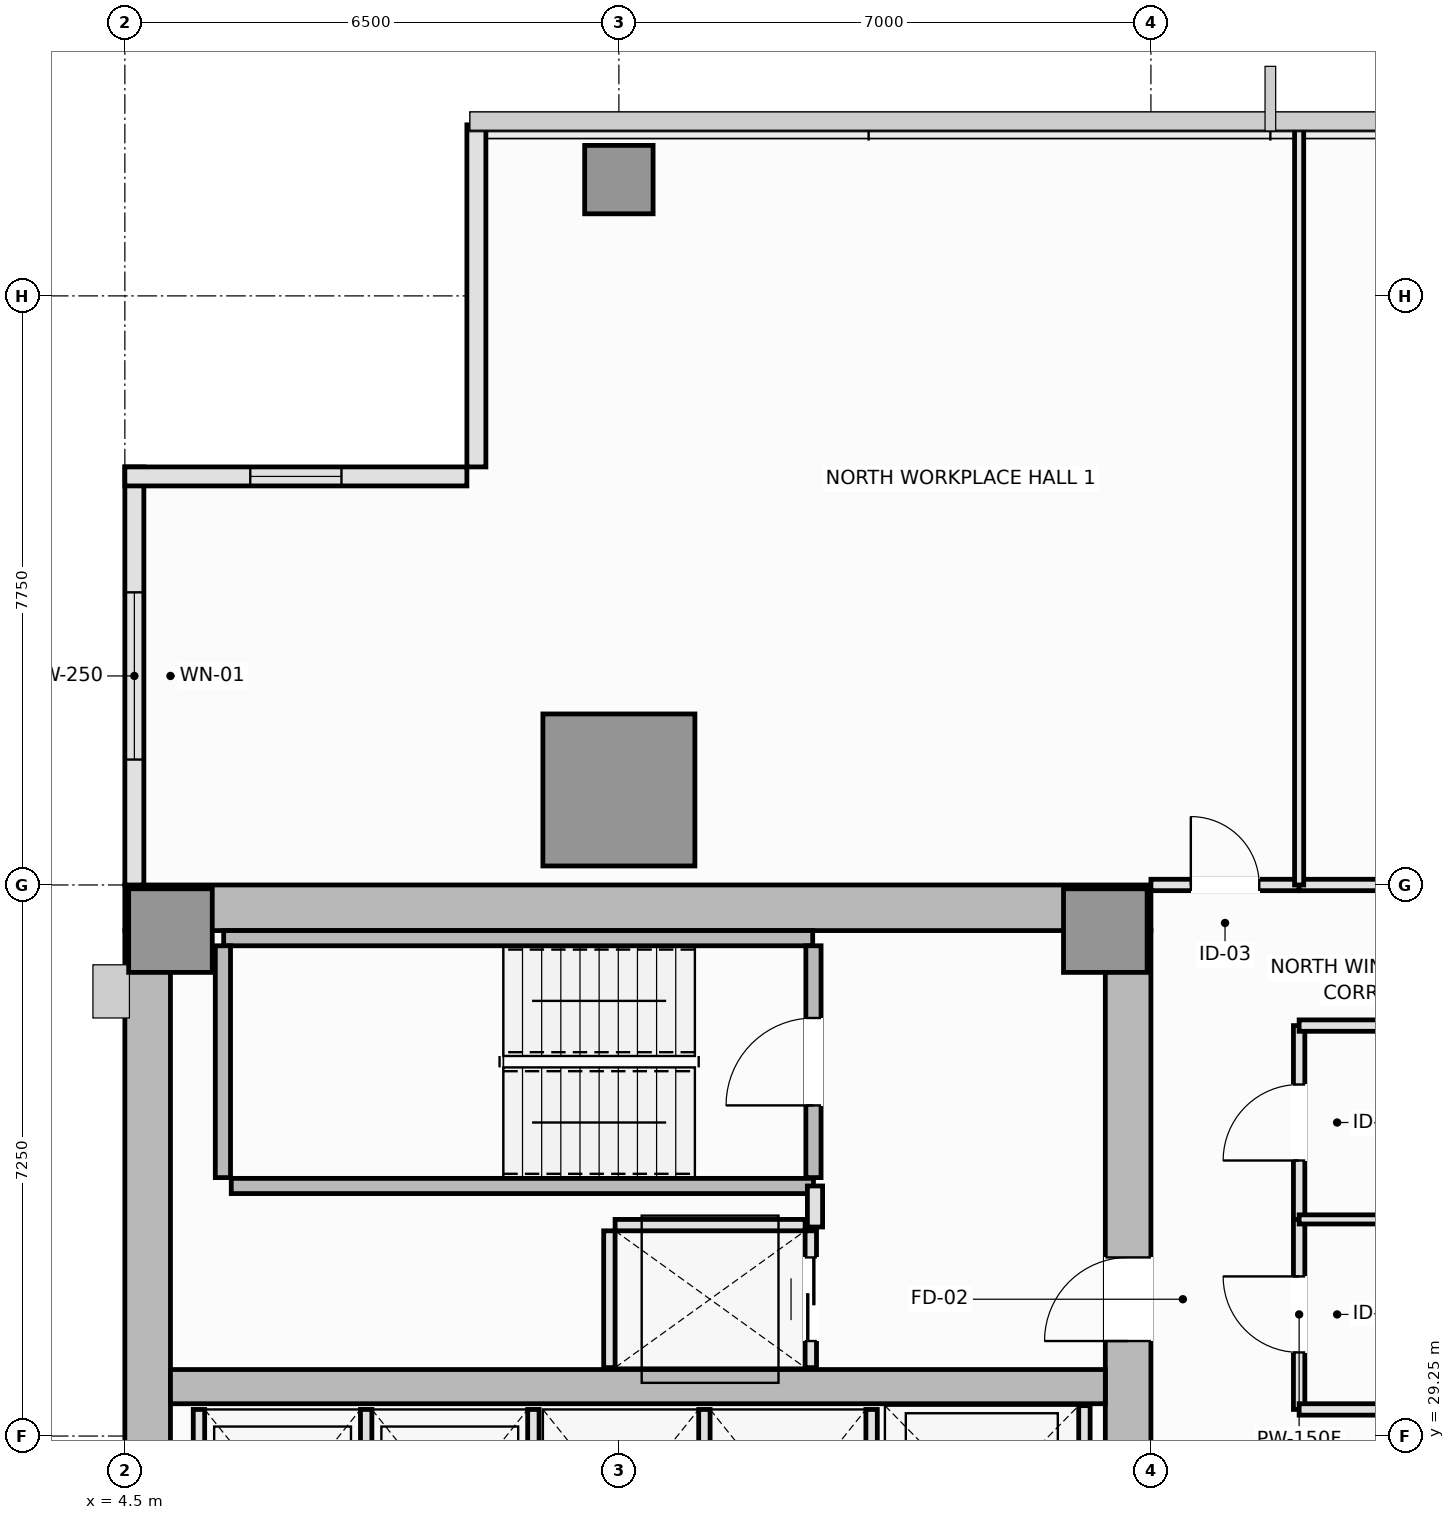
"""IFC4 building model, lengths in metres.
Left out: names, types, materials, properties, quantities, classifications, styles, units other than length and angle.
Written with IfcOpenShell. Run it as: python <this file> out.ifc"""

import sys

from ifc_helpers import new_model, si_unit, direction, frame, frame_2d, origin, origin_2d, place, context, subcontext, project, spatial, rectangle, extrude, element, fill, save


model = new_model("IFC4")
c1 = context("Model", 3, precision=1e-05, world=origin(), true_north=direction((0.0, 1.0)))
c2 = subcontext(c1, "Body", "Model", "MODEL_VIEW")
j1 = project(units=[si_unit("LENGTHUNIT", "METRE"), si_unit("PLANEANGLEUNIT", "RADIAN")], contexts=[c1])
p1 = place(None, origin())
s1 = spatial("IfcSite", under=j1, at=p1, CompositionType="ELEMENT")
p2 = place(p1, origin())
s2 = spatial("IfcBuilding", under=s1, at=p2, CompositionType="ELEMENT")
p3 = place(p2, frame((0.0, 0.0, 159.05)))
s3 = spatial("IfcBuildingStorey", under=s2, at=p3, CompositionType="ELEMENT", Elevation=159.05)
p4 = place(p3, frame((4.5, 36.2, 0.0), z_axis=(0.0, 0.0, 1.0), x_axis=(1.0, 0.0, 0.0)))
e1 = element("IfcWall", 1, at=p4, inside=s3, PredefinedType="SHEAR", context=c2, shape_type="SweptSolid", body=[
    extrude(rectangle(XDim=13.5, YDim=0.6, at=frame_2d((6.75, 0.0))), origin(), (0.0, 0.0, 1.0), 3.55),
])
p5 = place(p3, frame((4.8, 14.6, 0.0), z_axis=(0.0, 0.0, 1.0), x_axis=(0.0, 1.0, 0.0)))
e2 = element("IfcWall", 2, at=p5, inside=s3, PredefinedType="SHEAR", context=c2, shape_type="SweptSolid", body=[
    extrude(rectangle(XDim=21.3, YDim=0.6, at=frame_2d((10.65, 0.0))), origin(), (0.0, 0.0, 1.0), 3.55),
])
p6 = place(p3, frame((17.7, 27.05, 0.0), z_axis=(0.0, 0.0, 1.0), x_axis=(0.0, 1.0, 0.0)))
e3 = element("IfcWall", 3, at=p6, inside=s3, PredefinedType="SHEAR", context=c2, shape_type="SweptSolid", body=[
    extrude(rectangle(XDim=8.85, YDim=0.6, at=frame_2d((4.425, 0.0))), origin(), (0.0, 0.0, 1.0), 3.55),
])
p7 = place(p6, frame((3.45, 0.0, 0.0)))
e4 = element("IfcOpeningElement", 4, at=p7, cuts=e3, PredefinedType="OPENING", context=c2, shape_type="SweptSolid", body=[
    extrude(rectangle(XDim=1.1, YDim=2.15, at=frame_2d((0.55, 1.075))), frame((0.0, 0.31, 0.0), z_axis=(0.0, -1.0, 0.0), x_axis=(1.0, 0.0, 0.0)), (0.0, 0.0, 1.0), 0.62),
])
p8 = place(p3, frame((5.1, 29.9, 0.0), z_axis=(0.0, 0.0, 1.0), x_axis=(1.0, 0.0, 0.0)))
e5 = element("IfcWall", 5, at=p8, inside=s3, PredefinedType="SHEAR", context=c2, shape_type="SweptSolid", body=[
    extrude(rectangle(XDim=12.3, YDim=0.45, at=frame_2d((6.15, 0.0))), origin(), (0.0, 0.0, 1.0), 3.55),
])
for number, where, z_axis, x_axis in (
    (6, (5.1, 35.9, 0.0), (0.0, 0.0, 1.0), (1.0, 0.0, 0.0)),
    (7, (17.4, 35.9, 0.0), (0.0, 0.0, 1.0), (1.0, 0.0, 0.0)),
):
    element("IfcColumn", number, at=place(p3, frame(where, z_axis=z_axis, x_axis=x_axis)), inside=s3, PredefinedType="PILASTER", context=c2, shape_type="SweptSolid", body=[
        extrude(rectangle(XDim=1.1, YDim=1.1, at=origin_2d()), origin(), (0.0, 0.0, 1.0), 3.55),
    ])
p9 = place(p3, frame((11.0, 37.75, 0.0), z_axis=(0.0, 0.0, 1.0), x_axis=(1.0, 0.0, 0.0)))
e8 = element("IfcColumn", 8, at=p9, inside=s3, PredefinedType="COLUMN", context=c2, shape_type="SweptSolid", body=[
    extrude(rectangle(XDim=2.0, YDim=2.0, at=origin_2d()), origin(), (0.0, 0.0, 1.0), 3.55),
])
p10 = place(p3, frame((11.0, 45.78, 0.0), z_axis=(0.0, 0.0, 1.0), x_axis=(1.0, 0.0, 0.0)))
e9 = element("IfcColumn", 9, at=p10, inside=s3, PredefinedType="COLUMN", context=c2, shape_type="SweptSolid", body=[
    extrude(rectangle(XDim=0.9, YDim=0.9, at=origin_2d()), origin(), (0.0, 0.0, 1.0), 3.55),
])
p11 = place(p3, frame((4.625, 42.0, 0.0), z_axis=(0.0, 0.0, 1.0), x_axis=(0.0, -1.0, 0.0)))
e10 = element("IfcWall", 10, at=p11, inside=s3, PredefinedType="SOLIDWALL", context=c2, shape_type="SweptSolid", body=[
    extrude(rectangle(XDim=5.5, YDim=0.25, at=frame_2d((2.75, 0.0))), origin(), (0.0, 0.0, 1.0), 3.37),
])
p12 = place(p11, frame((1.65, 0.0, 0.9)))
e11 = element("IfcOpeningElement", 11, at=p12, cuts=e10, PredefinedType="OPENING", context=c2, shape_type="SweptSolid", body=[
    extrude(rectangle(XDim=2.2, YDim=1.8, at=frame_2d((1.1, 0.9))), frame((0.0, 0.135, 0.0), z_axis=(0.0, -1.0, 0.0), x_axis=(1.0, 0.0, 0.0)), (0.0, 0.0, 1.0), 0.27),
])
p13 = place(p3, frame((9.125, 46.5, 0.0), z_axis=(0.0, 0.0, 1.0), x_axis=(0.0, -1.0, 0.0)))
e12 = element("IfcWall", 12, at=p13, inside=s3, PredefinedType="SOLIDWALL", context=c2, shape_type="SweptSolid", body=[
    extrude(rectangle(XDim=4.5, YDim=0.25, at=frame_2d((2.25, 0.0))), origin(), (0.0, 0.0, 1.0), 3.37),
])
p14 = place(p3, frame((9.0, 41.875, 0.0), z_axis=(0.0, 0.0, 1.0), x_axis=(-1.0, 0.0, 0.0)))
e13 = element("IfcWall", 13, at=p14, inside=s3, PredefinedType="SOLIDWALL", context=c2, shape_type="SweptSolid", body=[
    extrude(rectangle(XDim=4.5, YDim=0.25, at=frame_2d((2.25, 0.0))), origin(), (0.0, 0.0, 1.0), 3.37),
])
p15 = place(p14, frame((1.65, 0.0, 0.9)))
e14 = element("IfcOpeningElement", 14, at=p15, cuts=e13, PredefinedType="OPENING", context=c2, shape_type="SweptSolid", body=[
    extrude(rectangle(XDim=1.2, YDim=1.8, at=frame_2d((0.6, 0.9))), frame((0.0, 0.135, 0.0), z_axis=(0.0, -1.0, 0.0), x_axis=(1.0, 0.0, 0.0)), (0.0, 0.0, 1.0), 0.27),
])
p16 = place(p3, frame((5.8, 35.8, 0.0), z_axis=(0.0, 0.0, 1.0), x_axis=(1.0, 0.0, 0.0)))
e15 = element("IfcWall", 15, at=p16, inside=s3, PredefinedType="SOLIDWALL", context=c2, shape_type="SweptSolid", body=[
    extrude(rectangle(XDim=7.75, YDim=0.2, at=frame_2d((3.875, 0.0))), origin(), (0.0, 0.0, 1.0), 3.55),
])
p17 = place(p3, frame((5.79, 32.65, 0.0), z_axis=(0.0, 0.0, 1.0), x_axis=(0.0, 1.0, 0.0)))
e16 = element("IfcWall", 16, at=p17, inside=s3, PredefinedType="SOLIDWALL", context=c2, shape_type="SweptSolid", body=[
    extrude(rectangle(XDim=3.05, YDim=0.2, at=frame_2d((1.525, 0.0))), origin(), (0.0, 0.0, 1.0), 3.55),
])
p18 = place(p3, frame((5.9, 32.54, 0.0), z_axis=(0.0, 0.0, 1.0), x_axis=(1.0, 0.0, 0.0)))
e17 = element("IfcWall", 17, at=p18, inside=s3, PredefinedType="SOLIDWALL", context=c2, shape_type="SweptSolid", body=[
    extrude(rectangle(XDim=7.66, YDim=0.2, at=frame_2d((3.83, 0.0))), origin(), (0.0, 0.0, 1.0), 3.55),
])
p19 = place(p3, frame((13.56, 32.65, 0.0), z_axis=(0.0, 0.0, 1.0), x_axis=(0.0, 1.0, 0.0)))
e18 = element("IfcWall", 18, at=p19, inside=s3, PredefinedType="SOLIDWALL", context=c2, shape_type="SweptSolid", body=[
    extrude(rectangle(XDim=3.05, YDim=0.2, at=frame_2d((1.525, 0.0))), origin(), (0.0, 0.0, 1.0), 3.55),
])
p20 = place(p19, frame((0.95, 0.0, 0.0)))
e19 = element("IfcOpeningElement", 19, at=p20, cuts=e18, PredefinedType="OPENING", context=c2, shape_type="SweptSolid", body=[
    extrude(rectangle(XDim=1.15, YDim=2.15, at=frame_2d((0.575, 1.075))), frame((0.0, 0.11, 0.0), z_axis=(0.0, -1.0, 0.0), x_axis=(1.0, 0.0, 0.0)), (0.0, 0.0, 1.0), 0.22),
])
for number, where, z_axis, x_axis in (
    (20, (5.475, 27.05, 0.0), (0.0, 0.0, 1.0), (0.0, 1.0, 0.0)),
    (21, (7.675, 27.05, 0.0), (0.0, 0.0, 1.0), (0.0, 1.0, 0.0)),
    (22, (9.875, 27.05, 0.0), (0.0, 0.0, 1.0), (0.0, 1.0, 0.0)),
    (23, (12.125, 27.05, 0.0), (0.0, 0.0, 1.0), (0.0, 1.0, 0.0)),
    (24, (14.325, 27.05, 0.0), (0.0, 0.0, 1.0), (0.0, 1.0, 0.0)),
):
    element("IfcWall", number, at=place(p3, frame(where, z_axis=z_axis, x_axis=x_axis)), inside=s3, PredefinedType="PARTITIONING", context=c2, shape_type="SweptSolid", body=[
        extrude(rectangle(XDim=2.55, YDim=0.15, at=frame_2d((1.275, 0.0))), origin(), (0.0, 0.0, 1.0), 3.37),
    ])
p21 = place(p3, frame((17.125, 27.05, 0.0), z_axis=(0.0, 0.0, 1.0), x_axis=(0.0, 1.0, 0.0)))
e25 = element("IfcWall", 25, at=p21, inside=s3, PredefinedType="PARTITIONING", context=c2, shape_type="SweptSolid", body=[
    extrude(rectangle(XDim=2.6, YDim=0.15, at=frame_2d((1.3, 0.0))), origin(), (0.0, 0.0, 1.0), 3.37),
])
p22 = place(p3, frame((10.95, 32.025, 0.0), z_axis=(0.0, 0.0, 1.0), x_axis=(1.0, 0.0, 0.0)))
e26 = element("IfcWall", 26, at=p22, inside=s3, PredefinedType="PARTITIONING", context=c2, shape_type="SweptSolid", body=[
    extrude(rectangle(XDim=2.5, YDim=0.15, at=frame_2d((1.25, 0.0))), origin(), (0.0, 0.0, 1.0), 3.37),
])
p23 = place(p3, frame((10.875, 30.15, 0.0), z_axis=(0.0, 0.0, 1.0), x_axis=(0.0, 1.0, 0.0)))
e27 = element("IfcWall", 27, at=p23, inside=s3, PredefinedType="PARTITIONING", context=c2, shape_type="SweptSolid", body=[
    extrude(rectangle(XDim=1.8, YDim=0.15, at=frame_2d((0.9, 0.0))), origin(), (0.0, 0.0, 1.0), 3.37),
])
p24 = place(p3, frame((13.525, 30.15, 0.0), z_axis=(0.0, 0.0, 1.0), x_axis=(0.0, 1.0, 0.0)))
e28 = element("IfcWall", 28, at=p24, inside=s3, PredefinedType="PARTITIONING", context=c2, shape_type="SweptSolid", body=[
    extrude(rectangle(XDim=1.8, YDim=0.15, at=frame_2d((0.9, 0.0))), origin(), (0.0, 0.0, 1.0), 3.37),
])
p25 = place(p24, frame((0.35, 0.0, 0.0)))
e29 = element("IfcOpeningElement", 29, at=p25, cuts=e28, PredefinedType="OPENING", context=c2, shape_type="SweptSolid", body=[
    extrude(rectangle(XDim=1.1, YDim=2.2, at=frame_2d((0.55, 1.1))), frame((0.0, 0.085, 0.0), z_axis=(0.0, -1.0, 0.0), x_axis=(1.0, 0.0, 0.0)), (0.0, 0.0, 1.0), 0.17),
])
p26 = place(p3, frame((13.58, 32.0, 0.0), z_axis=(0.0, 0.0, 1.0), x_axis=(0.0, 1.0, 0.0)))
e30 = element("IfcWall", 30, at=p26, inside=s3, PredefinedType="PARTITIONING", context=c2, shape_type="SweptSolid", body=[
    extrude(rectangle(XDim=0.54, YDim=0.2, at=frame_2d((0.27, 0.0))), origin(), (0.0, 0.0, 1.0), 3.37),
])
p27 = place(p3, frame((19.95, 29.6, 0.0), z_axis=(0.0, 0.0, 1.0), x_axis=(0.0, 1.0, 0.0)))
e31 = element("IfcWall", 31, at=p27, inside=s3, PredefinedType="PARTITIONING", context=c2, shape_type="SweptSolid", body=[
    extrude(rectangle(XDim=2.5, YDim=0.15, at=frame_2d((1.25, 0.0))), origin(), (0.0, 0.0, 1.0), 3.37),
])
p28 = place(p27, frame((0.75, 0.0, 0.0)))
e32 = element("IfcOpeningElement", 32, at=p28, cuts=e31, PredefinedType="OPENING", context=c2, shape_type="SweptSolid", body=[
    extrude(rectangle(XDim=1.0, YDim=2.15, at=frame_2d((0.5, 1.075))), frame((0.0, 0.085, 0.0), z_axis=(0.0, -1.0, 0.0), x_axis=(1.0, 0.0, 0.0)), (0.0, 0.0, 1.0), 0.17),
])
p29 = place(p3, frame((19.95, 32.1, 0.0), z_axis=(0.0, 0.0, 1.0), x_axis=(0.0, 1.0, 0.0)))
e33 = element("IfcWall", 33, at=p29, inside=s3, PredefinedType="PARTITIONING", context=c2, shape_type="SweptSolid", body=[
    extrude(rectangle(XDim=2.55, YDim=0.15, at=frame_2d((1.275, 0.0))), origin(), (0.0, 0.0, 1.0), 3.37),
])
p30 = place(p29, frame((0.775, 0.0, 0.0)))
e34 = element("IfcOpeningElement", 34, at=p30, cuts=e33, PredefinedType="OPENING", context=c2, shape_type="SweptSolid", body=[
    extrude(rectangle(XDim=1.0, YDim=2.15, at=frame_2d((0.5, 1.075))), frame((0.0, 0.085, 0.0), z_axis=(0.0, -1.0, 0.0), x_axis=(1.0, 0.0, 0.0)), (0.0, 0.0, 1.0), 0.17),
])
p31 = place(p3, frame((18.0, 36.5, 0.0), z_axis=(0.0, 0.0, 1.0), x_axis=(1.0, 0.0, 0.0)))
e35 = element("IfcWall", 35, at=p31, inside=s3, PredefinedType="PARTITIONING", context=c2, shape_type="SweptSolid", body=[
    extrude(rectangle(XDim=1.95, YDim=0.15, at=frame_2d((0.975, 0.0))), origin(), (0.0, 0.0, 1.0), 3.37),
])
p32 = place(p31, frame((0.525, 0.0, 0.0)))
e36 = element("IfcOpeningElement", 36, at=p32, cuts=e35, PredefinedType="OPENING", context=c2, shape_type="SweptSolid", body=[
    extrude(rectangle(XDim=0.9, YDim=2.1, at=frame_2d((0.45, 1.05))), frame((0.0, 0.085, 0.0), z_axis=(0.0, -1.0, 0.0), x_axis=(1.0, 0.0, 0.0)), (0.0, 0.0, 1.0), 0.17),
])
for number, where, z_axis, x_axis in (
    (37, (19.95, 29.6, 0.0), (0.0, 0.0, 1.0), (1.0, 0.0, 0.0)),
    (38, (19.95, 34.65, 0.0), (0.0, 0.0, 1.0), (1.0, 0.0, 0.0)),
):
    element("IfcWall", number, at=place(p3, frame(where, z_axis=z_axis, x_axis=x_axis)), inside=s3, PredefinedType="PARTITIONING", context=c2, shape_type="SweptSolid", body=[
        extrude(rectangle(XDim=7.55, YDim=0.15, at=frame_2d((3.775, 0.0))), origin(), (0.0, 0.0, 1.0), 3.37),
    ])
p33 = place(p3, frame((19.95, 36.5, 0.0), z_axis=(0.0, 0.0, 1.0), x_axis=(1.0, 0.0, 0.0)))
e39 = element("IfcWall", 39, at=p33, inside=s3, PredefinedType="PARTITIONING", context=c2, shape_type="SweptSolid", body=[
    extrude(rectangle(XDim=7.55, YDim=0.15, at=frame_2d((3.775, 0.0))), origin(), (0.0, 0.0, 1.0), 3.37),
])
p34 = place(p33, frame((3.275, 0.0, 0.0)))
e40 = element("IfcOpeningElement", 40, at=p34, cuts=e39, PredefinedType="OPENING", context=c2, shape_type="SweptSolid", body=[
    extrude(rectangle(XDim=1.0, YDim=2.15, at=frame_2d((0.5, 1.075))), frame((0.0, 0.085, 0.0), z_axis=(0.0, -1.0, 0.0), x_axis=(1.0, 0.0, 0.0)), (0.0, 0.0, 1.0), 0.17),
])
p35 = place(p3, frame((19.95, 32.1, 0.0), z_axis=(0.0, 0.0, 1.0), x_axis=(1.0, 0.0, 0.0)))
e41 = element("IfcWall", 41, at=p35, inside=s3, PredefinedType="PARTITIONING", context=c2, shape_type="SweptSolid", body=[
    extrude(rectangle(XDim=7.55, YDim=0.12, at=frame_2d((3.775, 0.0))), origin(), (0.0, 0.0, 1.0), 2.77),
])
p36 = place(p3, frame((19.95, 36.5, 0.0), z_axis=(0.0, 0.0, 1.0), x_axis=(0.0, 1.0, 0.0)))
e42 = element("IfcWall", 42, at=p36, inside=s3, PredefinedType="PARTITIONING", context=c2, shape_type="SweptSolid", body=[
    extrude(rectangle(XDim=9.99, YDim=0.12, at=frame_2d((4.995, 0.0))), origin(), (0.0, 0.0, 1.0), 3.37),
])
p37 = place(p12, origin())
e43 = element("IfcWindow", 43, at=p37, inside=s3, PartitioningType="SINGLE_PANEL", PredefinedType="WINDOW", context=c2, shape_type="SweptSolid", body=[
    extrude(rectangle(XDim=2.2, YDim=1.8, at=frame_2d((1.1, 0.9))), frame((0.0, 0.03, 0.0), z_axis=(0.0, -1.0, 0.0), x_axis=(1.0, 0.0, 0.0)), (0.0, 0.0, 1.0), 0.06),
])
fill(e11, e43)
p38 = place(p15, origin())
e44 = element("IfcWindow", 44, at=p38, inside=s3, PartitioningType="SINGLE_PANEL", PredefinedType="WINDOW", context=c2, shape_type="SweptSolid", body=[
    extrude(rectangle(XDim=1.2, YDim=1.8, at=frame_2d((0.6, 0.9))), frame((0.0, 0.03, 0.0), z_axis=(0.0, -1.0, 0.0), x_axis=(1.0, 0.0, 0.0)), (0.0, 0.0, 1.0), 0.06),
])
fill(e14, e44)
p39 = place(p20, origin())
e45 = element("IfcDoor", 45, at=p39, inside=s3, OperationType="SINGLE_SWING_LEFT", PredefinedType="DOOR", context=c2, shape_type="SweptSolid", body=[
    extrude(rectangle(XDim=1.15, YDim=2.15, at=frame_2d((0.575, 1.075))), frame((0.0, 0.025, 0.0), z_axis=(0.0, -1.0, 0.0), x_axis=(1.0, 0.0, 0.0)), (0.0, 0.0, 1.0), 0.05),
])
fill(e19, e45)
p40 = place(p25, origin())
e46 = element("IfcDoor", 46, at=p40, inside=s3, OperationType="DOUBLE_DOOR_SLIDING", PredefinedType="DOOR", context=c2, shape_type="SweptSolid", body=[
    extrude(rectangle(XDim=1.1, YDim=2.2, at=frame_2d((0.55, 1.1))), frame((0.0, 0.025, 0.0), z_axis=(0.0, -1.0, 0.0), x_axis=(1.0, 0.0, 0.0)), (0.0, 0.0, 1.0), 0.05),
])
fill(e29, e46)
p41 = place(p7, origin())
e47 = element("IfcDoor", 47, at=p41, inside=s3, OperationType="SINGLE_SWING_LEFT", PredefinedType="DOOR", context=c2, shape_type="SweptSolid", body=[
    extrude(rectangle(XDim=1.1, YDim=2.15, at=frame_2d((0.55, 1.075))), frame((0.0, 0.025, 0.0), z_axis=(0.0, -1.0, 0.0), x_axis=(1.0, 0.0, 0.0)), (0.0, 0.0, 1.0), 0.05),
])
fill(e4, e47)
p42 = place(p28, origin())
e48 = element("IfcDoor", 48, at=p42, inside=s3, OperationType="SINGLE_SWING_RIGHT", PredefinedType="DOOR", context=c2, shape_type="SweptSolid", body=[
    extrude(rectangle(XDim=1.0, YDim=2.15, at=frame_2d((0.5, 1.075))), frame((0.0, 0.025, 0.0), z_axis=(0.0, -1.0, 0.0), x_axis=(1.0, 0.0, 0.0)), (0.0, 0.0, 1.0), 0.05),
])
fill(e32, e48)
p43 = place(p30, origin())
e49 = element("IfcDoor", 49, at=p43, inside=s3, OperationType="SINGLE_SWING_LEFT", PredefinedType="DOOR", context=c2, shape_type="SweptSolid", body=[
    extrude(rectangle(XDim=1.0, YDim=2.15, at=frame_2d((0.5, 1.075))), frame((0.0, 0.025, 0.0), z_axis=(0.0, -1.0, 0.0), x_axis=(1.0, 0.0, 0.0)), (0.0, 0.0, 1.0), 0.05),
])
fill(e34, e49)
p44 = place(p32, origin())
e50 = element("IfcDoor", 50, at=p44, inside=s3, OperationType="SINGLE_SWING_LEFT", PredefinedType="DOOR", context=c2, shape_type="SweptSolid", body=[
    extrude(rectangle(XDim=0.9, YDim=2.1, at=frame_2d((0.45, 1.05))), frame((0.0, 0.025, 0.0), z_axis=(0.0, -1.0, 0.0), x_axis=(1.0, 0.0, 0.0)), (0.0, 0.0, 1.0), 0.05),
])
fill(e36, e50)
save(model, sys.argv[1])
